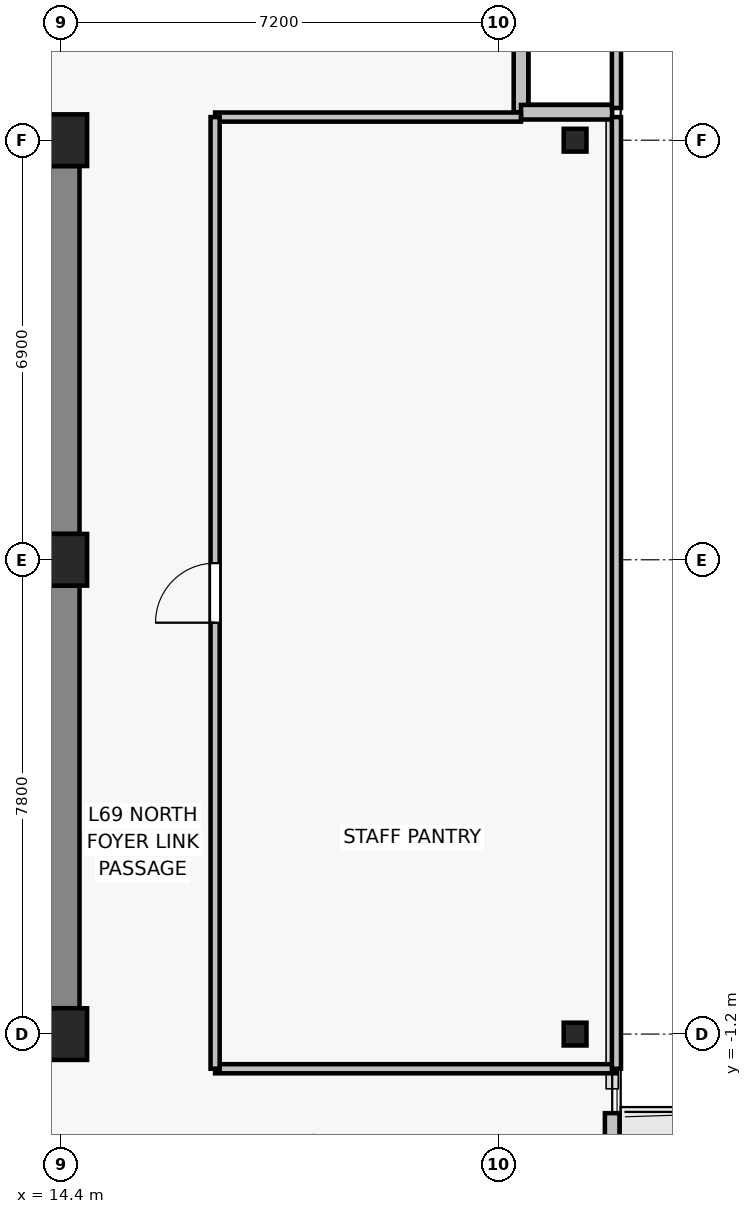
"""IFC4 building model, lengths in metres.
Left out: names, types, materials, properties, quantities, classifications, styles, units other than length and angle.
Written with IfcOpenShell. Run it as: python <this file> out.ifc"""

import sys

from ifc_helpers import new_model, si_unit, direction, frame, frame_2d, origin, origin_2d, place, context, subcontext, project, spatial, rectangle, i_section, extrude, source, transform, mapped, element, fill, save


model = new_model("IFC4")
c1 = context("Model", 3, precision=1e-05, world=origin(), true_north=direction((0.0, 1.0)))
c2 = subcontext(c1, "Body", "Model", "MODEL_VIEW")
j1 = project(units=[si_unit("LENGTHUNIT", "METRE"), si_unit("PLANEANGLEUNIT", "RADIAN")], contexts=[c1])
p1 = place(None, origin())
s1 = spatial("IfcSite", under=j1, at=p1, CompositionType="ELEMENT")
p2 = place(p1, origin())
s2 = spatial("IfcBuilding", under=s1, at=p2, CompositionType="ELEMENT")
p3 = place(p2, frame((0.0, 0.0, 245.2)))
s3 = spatial("IfcBuildingStorey", under=s2, at=p3, CompositionType="ELEMENT", Elevation=245.2)
for number, where, z_axis, x_axis in (
    (1, (14.4, -1.2, 0.0), (0.0, 0.0, 1.0), (1.0, 0.0, 0.0)),
    (2, (14.4, 6.6, 0.0), (0.0, 0.0, 1.0), (1.0, 0.0, 0.0)),
    (3, (14.4, 13.5, 0.0), (0.0, 0.0, 1.0), (1.0, 0.0, 0.0)),
):
    element("IfcColumn", number, at=place(p3, frame(where, z_axis=z_axis, x_axis=x_axis)), inside=s3, PredefinedType="COLUMN", context=c2, shape_type="SweptSolid", body=[
        extrude(rectangle(XDim=0.85, YDim=0.85, at=origin_2d()), origin(), (0.0, 0.0, 1.0), 3.3),
    ])
for number, where, z_axis, x_axis in (
    (4, (22.85, -1.2, 0.0), (0.0, 0.0, 1.0), (1.0, 0.0, 0.0)),
    (5, (22.85, 13.5, 0.0), (0.0, 0.0, 1.0), (1.0, 0.0, 0.0)),
):
    element("IfcColumn", number, at=place(p3, frame(where, z_axis=z_axis, x_axis=x_axis)), inside=s3, PredefinedType="COLUMN", context=c2, shape_type="SweptSolid", body=[
        extrude(i_section(OverallWidth=0.375, OverallDepth=0.375, WebThickness=0.017, FlangeThickness=0.027, FilletRadius=0.015, at=origin_2d()), origin(), (0.0, 0.0, 1.0), 3.3),
    ])
p4 = place(p3, frame((14.4, -0.775, 0.0), z_axis=(0.0, 0.0, 1.0), x_axis=(0.0, 1.0, 0.0)))
e6 = element("IfcWall", 6, at=p4, inside=s3, PredefinedType="SHEAR", context=c2, shape_type="SweptSolid", body=[
    extrude(rectangle(XDim=6.95, YDim=0.6, at=frame_2d((3.475, 0.0))), origin(), (0.0, 0.0, 1.0), 3.075),
])
p5 = place(p3, frame((14.4, 7.025, 0.0), z_axis=(0.0, 0.0, 1.0), x_axis=(0.0, 1.0, 0.0)))
e7 = element("IfcWall", 7, at=p5, inside=s3, PredefinedType="SHEAR", context=c2, shape_type="SweptSolid", body=[
    extrude(rectangle(XDim=6.05, YDim=0.6, at=frame_2d((3.025, 0.0))), origin(), (0.0, 0.0, 1.0), 3.075),
])
p6 = place(p3, frame((23.46, -2.5, 0.0), z_axis=(0.0, 0.0, 1.0), x_axis=(0.0, -1.0, 0.0)))
e8 = element("IfcWall", 8, at=p6, inside=s3, PredefinedType="SOLIDWALL", context=c2, shape_type="SweptSolid", body=[
    extrude(rectangle(XDim=5.8, YDim=0.24, at=frame_2d((2.9, 0.0))), origin(), (0.0, 0.0, 1.0), 3.075),
])
p7 = place(p6, frame((1.566, 0.0, 0.0)))
e9 = element("IfcOpeningElement", 9, at=p7, cuts=e8, PredefinedType="OPENING", context=c2, shape_type="SweptSolid", body=[
    extrude(rectangle(XDim=1.0, YDim=2.2, at=frame_2d((0.5, 1.1))), frame((0.0, 0.13, 0.0), z_axis=(0.0, -1.0, 0.0), x_axis=(1.0, 0.0, 0.0)), (0.0, 0.0, 1.0), 0.26),
])
p8 = place(p6, frame((2.916, 0.0, 0.85)))
e10 = element("IfcOpeningElement", 10, at=p8, cuts=e8, PredefinedType="OPENING", context=c2, shape_type="SweptSolid", body=[
    extrude(rectangle(XDim=1.5, YDim=1.6, at=frame_2d((0.75, 0.8))), frame((0.0, 0.13, 0.0), z_axis=(0.0, -1.0, 0.0), x_axis=(1.0, 0.0, 0.0)), (0.0, 0.0, 1.0), 0.26),
])
for number, where, z_axis, x_axis in (
    (11, (21.96, 13.96, 0.0), (0.0, 0.0, 1.0), (0.0, 1.0, 0.0)),
    (12, (23.46, 13.96, 0.0), (0.0, 0.0, 1.0), (-1.0, 0.0, 0.0)),
):
    element("IfcWall", number, at=place(p3, frame(where, z_axis=z_axis, x_axis=x_axis)), inside=s3, PredefinedType="SOLIDWALL", context=c2, shape_type="SweptSolid", body=[
        extrude(rectangle(XDim=1.5, YDim=0.24, at=frame_2d((0.75, 0.0))), origin(), (0.0, 0.0, 1.0), 3.075),
    ])
p9 = place(p3, frame((23.53, -1.77, 0.0), z_axis=(0.0, 0.0, 1.0), x_axis=(-1.0, 0.0, 0.0)))
e13 = element("IfcWall", 13, at=p9, inside=s3, PredefinedType="PARTITIONING", context=c2, shape_type="SweptSolid", body=[
    extrude(rectangle(XDim=6.6, YDim=0.15, at=frame_2d((3.3, 0.0))), origin(), (0.0, 0.0, 1.0), 2.765),
])
p10 = place(p3, frame((16.93, 13.88, 0.0), z_axis=(0.0, 0.0, 1.0), x_axis=(1.0, 0.0, 0.0)))
e14 = element("IfcWall", 14, at=p10, inside=s3, PredefinedType="PARTITIONING", context=c2, shape_type="SweptSolid", body=[
    extrude(rectangle(XDim=5.03, YDim=0.15, at=frame_2d((2.515, 0.0))), origin(), (0.0, 0.0, 1.0), 3.075),
])
p11 = place(p3, frame((16.93, -1.77, 0.0), z_axis=(0.0, 0.0, 1.0), x_axis=(0.0, 1.0, 0.0)))
e15 = element("IfcWall", 15, at=p11, inside=s3, PredefinedType="PARTITIONING", context=c2, shape_type="SweptSolid", body=[
    extrude(rectangle(XDim=15.65, YDim=0.15, at=frame_2d((7.825, 0.0))), origin(), (0.0, 0.0, 1.0), 2.615),
])
p12 = place(p11, frame((7.335, 0.0, 0.0)))
e16 = element("IfcOpeningElement", 16, at=p12, cuts=e15, PredefinedType="OPENING", context=c2, shape_type="SweptSolid", body=[
    extrude(rectangle(XDim=0.98, YDim=2.15, at=frame_2d((0.49, 1.075))), frame((0.0, 0.085, 0.0), z_axis=(0.0, -1.0, 0.0), x_axis=(1.0, 0.0, 0.0)), (0.0, 0.0, 1.0), 0.17),
])
p13 = place(p3, frame((23.53, 13.88, 0.0), z_axis=(0.0, 0.0, 1.0), x_axis=(0.0, -1.0, 0.0)))
e17 = element("IfcWall", 17, at=p13, inside=s3, PredefinedType="PARTITIONING", context=c2, shape_type="SweptSolid", body=[
    extrude(rectangle(XDim=15.65, YDim=0.15, at=frame_2d((7.825, 0.0))), origin(), (0.0, 0.0, 1.0), 3.075),
])
p14 = place(p3, frame((23.53, 17.03, 0.0), z_axis=(0.0, 0.0, 1.0), x_axis=(0.0, -1.0, 0.0)))
e18 = element("IfcWall", 18, at=p14, inside=s3, PredefinedType="PARTITIONING", context=c2, shape_type="SweptSolid", body=[
    extrude(rectangle(XDim=3.0, YDim=0.15, at=frame_2d((1.5, 0.0))), origin(), (0.0, 0.0, 1.0), 3.075),
])
m1 = source(origin(), c2, "Body", "SweptSolid", [
    extrude(rectangle(XDim=0.98, YDim=2.15, at=frame_2d((0.49, 1.075))), frame((0.0, 0.025, 0.0), z_axis=(0.0, -1.0, 0.0), x_axis=(1.0, 0.0, 0.0)), (0.0, 0.0, 1.0), 0.05),
])
p15 = place(p12, origin())
e19 = element("IfcDoor", 19, at=p15, inside=s3, OperationType="SINGLE_SWING_LEFT", PredefinedType="DOOR", context=c2, shape_type="MappedRepresentation", body=[
    mapped(m1, transform((0.0, 0.0, 0.0), x_axis=(1.0, 0.0, 0.0), y_axis=(0.0, 1.0, 0.0), z_axis=(0.0, 0.0, 1.0), scale=1.0)),
])
fill(e16, e19)
save(model, sys.argv[1])
